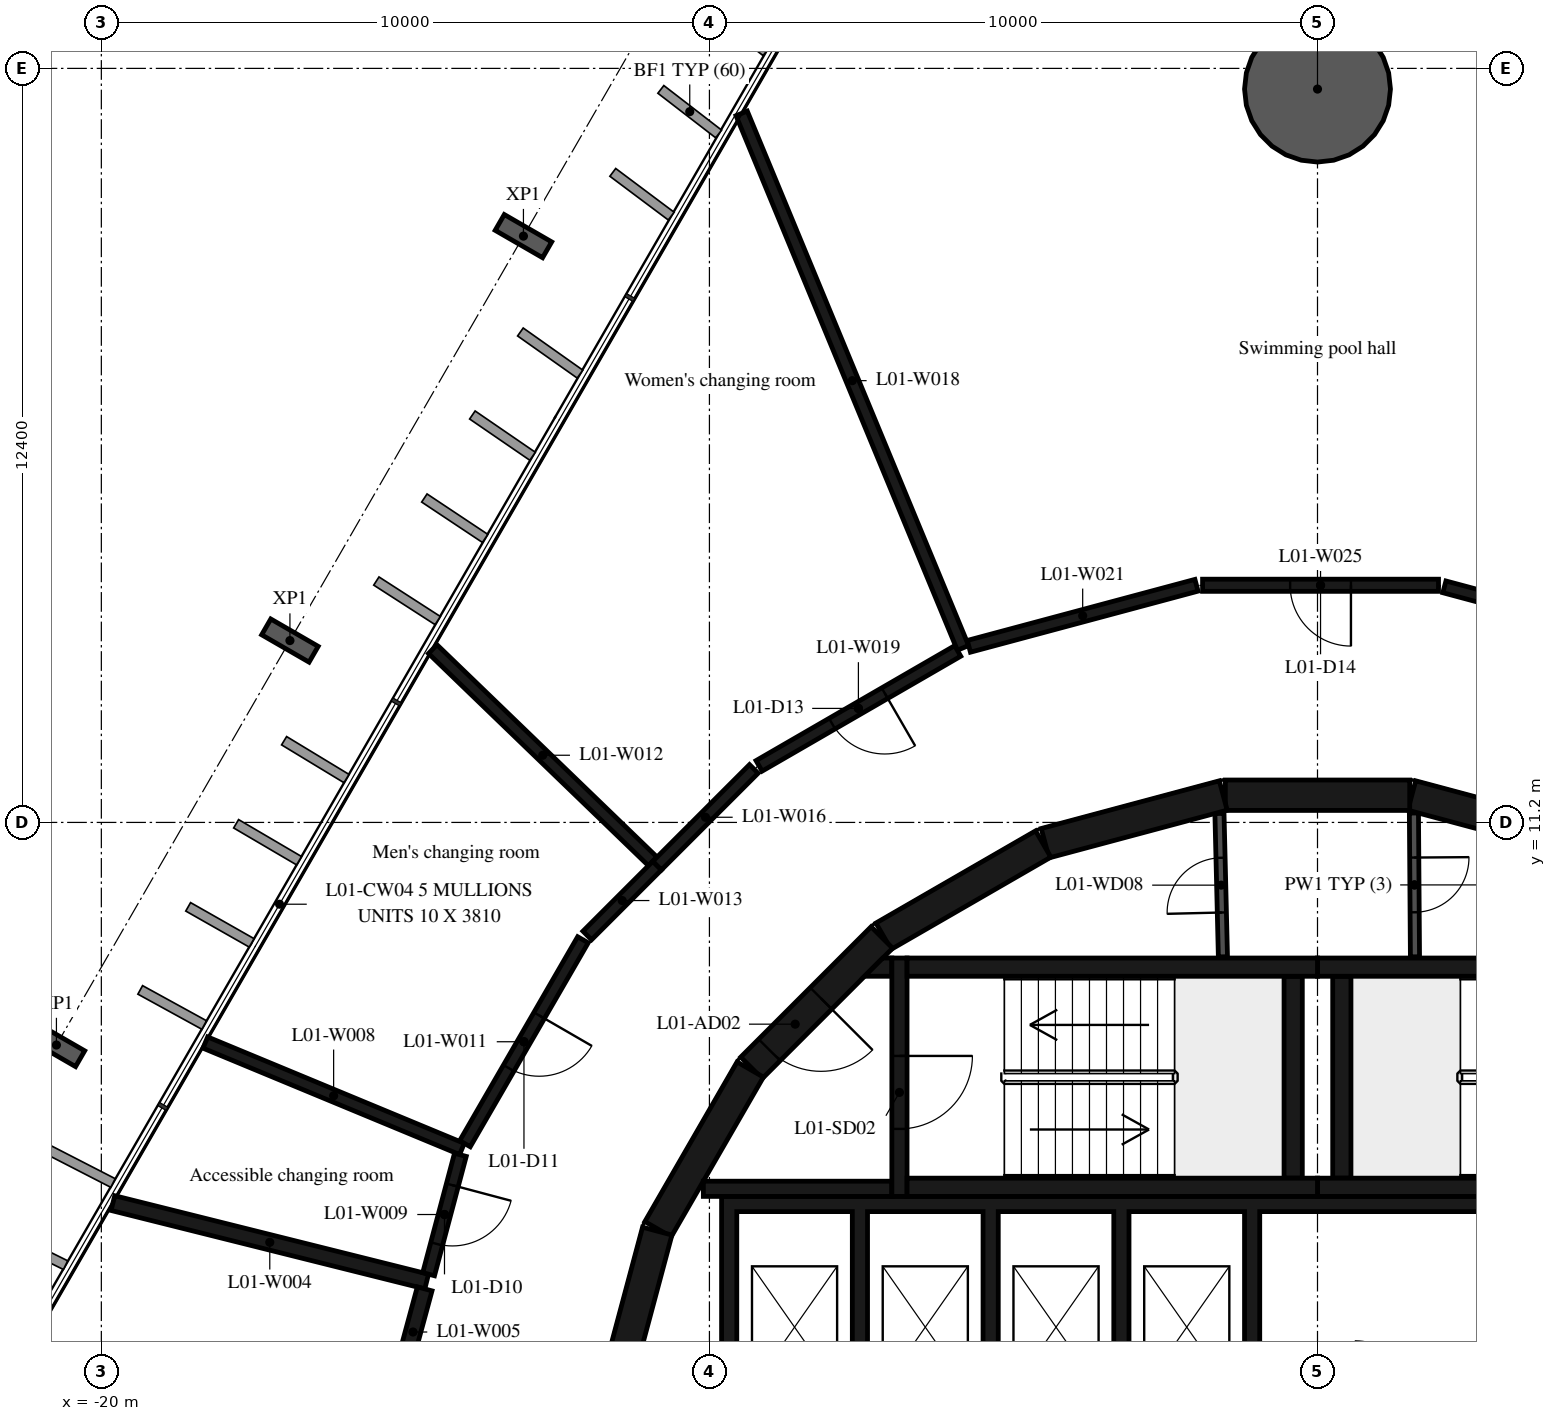
"""IFC4 building model, lengths in metres.
Left out: names, types, materials, properties, quantities, classifications, styles, units other than length and angle.
Written with IfcOpenShell. Run it as: python <this file> out.ifc"""

import sys

from ifc_helpers import new_model, si_unit, direction, frame, frame_2d, origin, origin_2d, place, context, subcontext, project, spatial, polyline, rectangle, hollow_circle, i_section, outline, extrude, element, fill, save


model = new_model("IFC4")
c1 = context("Model", 3, precision=1e-05, world=origin(), true_north=direction((0.0, 1.0)))
c2 = subcontext(c1, "Body", "Model", "MODEL_VIEW")
j1 = project(units=[si_unit("LENGTHUNIT", "METRE"), si_unit("PLANEANGLEUNIT", "RADIAN")], contexts=[c1])
p1 = place(None, origin())
s1 = spatial("IfcSite", under=j1, at=p1, CompositionType="ELEMENT")
p2 = place(p1, origin())
s2 = spatial("IfcBuilding", under=s1, at=p2, CompositionType="ELEMENT")
p3 = place(p2, frame((0.0, 0.0, 9.0)))
s3 = spatial("IfcBuildingStorey", under=s2, at=p3, CompositionType="ELEMENT", Elevation=9.0)
p4 = place(p3, frame((0.0, 23.26, -0.38), z_axis=(0.0, 0.0, 1.0), x_axis=(1.0, 0.0, 0.0)))
e1 = element("IfcColumn", 1, at=p4, inside=s3, PredefinedType="COLUMN", context=c2, shape_type="SweptSolid", body=[
    extrude(hollow_circle(Radius=1.2, WallThickness=0.06, at=origin_2d()), origin(), (0.0, 0.0, 1.0), 4.8),
])
for number, where, z_axis, x_axis in (
    (2, (-13.059, 20.842, -0.38), (0.0, 0.0, 1.0), (0.5, 0.866, 0.0)),
    (3, (-16.899, 14.19, -0.38), (0.0, 0.0, 1.0), (0.5, 0.866, 0.0)),
    (4, (-20.739, 7.539, -0.38), (0.0, 0.0, 1.0), (0.5, 0.866, 0.0)),
):
    element("IfcColumn", number, at=place(p3, frame(where, z_axis=z_axis, x_axis=x_axis)), inside=s3, PredefinedType="COLUMN", context=c2, shape_type="SweptSolid", body=[
        extrude(i_section(OverallWidth=0.3, OverallDepth=0.9, WebThickness=0.019, FlangeThickness=0.035, FilletRadius=0.03, at=origin_2d()), origin(), (0.0, 0.0, 1.0), 4.8),
    ])
for number, where, z_axis, x_axis in (
    (5, (4.479, 10.858, 0.0), (0.0, 0.0, 1.0), (-0.966, 0.259, 0.0)),
    (6, (1.516, 11.647, 0.0), (0.0, 0.0, 1.0), (-1.0, 0.0, 0.0)),
    (7, (-1.55, 11.643, 0.0), (0.0, 0.0, 1.0), (-0.966, -0.259, 0.0)),
    (8, (-4.51, 10.845, 0.0), (0.0, 0.0, 1.0), (-0.866, -0.5, 0.0)),
):
    element("IfcWall", number, at=place(p3, frame(where, z_axis=z_axis, x_axis=x_axis)), inside=s3, PredefinedType="SHEAR", context=c2, shape_type="SweptSolid", body=[
        extrude(rectangle(XDim=3.033, YDim=0.5, at=frame_2d((1.516, 0.0))), origin(), (0.0, 0.0, 1.0), 4.42),
    ])
p5 = place(p3, frame((-7.164, 9.308, 0.0), z_axis=(0.0, 0.0, 1.0), x_axis=(-0.707106781187, -0.707106781187, 0.0)))
e9 = element("IfcWall", 9, at=p5, inside=s3, PredefinedType="SHEAR", context=c2, shape_type="SweptSolid", body=[
    extrude(rectangle(XDim=3.032, YDim=0.5, at=frame_2d((1.516, 0.0))), origin(), (0.0, 0.0, 1.0), 4.42),
])
p6 = place(p5, frame((1.416, 0.0, 0.0)))
e10 = element("IfcOpeningElement", 10, at=p6, cuts=e9, PredefinedType="OPENING", context=c2, shape_type="SweptSolid", body=[
    extrude(rectangle(XDim=1.2, YDim=2.1, at=frame_2d((0.6, 1.05))), frame((0.0, 0.26, 0.0), z_axis=(0.0, -1.0, 0.0), x_axis=(1.0, 0.0, 0.0)), (0.0, 0.0, 1.0), 0.52),
])
for number, where, z_axis, x_axis in (
    (11, (-9.329, 7.137, 0.0), (0.0, 0.0, 1.0), (-0.5, -0.866, 0.0)),
    (12, (-10.858, 4.479, 0.0), (0.0, 0.0, 1.0), (-0.259, -0.966, 0.0)),
):
    element("IfcWall", number, at=place(p3, frame(where, z_axis=z_axis, x_axis=x_axis)), inside=s3, PredefinedType="SHEAR", context=c2, shape_type="SweptSolid", body=[
        extrude(rectangle(XDim=3.033, YDim=0.5, at=frame_2d((1.516, 0.0))), origin(), (0.0, 0.0, 1.0), 4.42),
    ])
for number, where, z_axis, x_axis in (
    (13, (0.0, 5.2, 0.0), (0.0, 0.0, 1.0), (1.0, 0.0, 0.0)),
    (14, (0.0, 8.82, 0.0), (0.0, 0.0, 1.0), (1.0, 0.0, 0.0)),
):
    element("IfcWall", number, at=place(p3, frame(where, z_axis=z_axis, x_axis=x_axis)), inside=s3, PredefinedType="SHEAR", context=c2, shape_type="SweptSolid", body=[
        extrude(rectangle(XDim=6.75, YDim=0.3, at=frame_2d((3.375, 0.0))), origin(), (0.0, 0.0, 1.0), 4.42),
    ])
p7 = place(p3, frame((0.4, 5.35, 0.0), z_axis=(0.0, 0.0, 1.0), x_axis=(0.0, 1.0, 0.0)))
e15 = element("IfcWall", 15, at=p7, inside=s3, PredefinedType="SHEAR", context=c2, shape_type="SweptSolid", body=[
    extrude(rectangle(XDim=3.32, YDim=0.3, at=frame_2d((1.66, 0.0))), origin(), (0.0, 0.0, 1.0), 4.42),
])
for number, where, z_axis, x_axis in (
    (16, (-6.75, 5.2, 0.0), (0.0, 0.0, 1.0), (1.0, 0.0, 0.0)),
    (17, (-6.75, 8.82, 0.0), (0.0, 0.0, 1.0), (1.0, 0.0, 0.0)),
):
    element("IfcWall", number, at=place(p3, frame(where, z_axis=z_axis, x_axis=x_axis)), inside=s3, PredefinedType="SHEAR", context=c2, shape_type="SweptSolid", body=[
        extrude(rectangle(XDim=6.75, YDim=0.3, at=frame_2d((3.375, 0.0))), origin(), (0.0, 0.0, 1.0), 4.42),
    ])
p8 = place(p3, frame((-0.4, 5.35, 0.0), z_axis=(0.0, 0.0, 1.0), x_axis=(0.0, 1.0, 0.0)))
e18 = element("IfcWall", 18, at=p8, inside=s3, PredefinedType="SHEAR", context=c2, shape_type="SweptSolid", body=[
    extrude(rectangle(XDim=3.32, YDim=0.3, at=frame_2d((1.66, 0.0))), origin(), (0.0, 0.0, 1.0), 4.42),
])
p9 = place(p3, frame((-6.875, 8.97, 0.0), z_axis=(0.0, 0.0, 1.0), x_axis=(0.0, -1.0, 0.0)))
e19 = element("IfcWall", 19, at=p9, inside=s3, PredefinedType="SHEAR", context=c2, shape_type="SweptSolid", body=[
    extrude(rectangle(XDim=3.92, YDim=0.25, at=frame_2d((1.96, 0.0))), origin(), (0.0, 0.0, 1.0), 4.42),
])
p10 = place(p9, frame((1.61, 0.0, 0.0)))
e20 = element("IfcOpeningElement", 20, at=p10, cuts=e19, PredefinedType="OPENING", context=c2, shape_type="SweptSolid", body=[
    extrude(rectangle(XDim=1.2, YDim=2.1, at=frame_2d((0.6, 1.05))), frame((0.0, 0.135, 0.0), z_axis=(0.0, -1.0, 0.0), x_axis=(1.0, 0.0, 0.0)), (0.0, 0.0, 1.0), 0.27),
])
p11 = place(p3, frame((-7.0, 5.175, 0.0), z_axis=(0.0, 0.0, 1.0), x_axis=(-1.0, 0.0, 0.0)))
e21 = element("IfcWall", 21, at=p11, inside=s3, PredefinedType="SHEAR", context=c2, shape_type="SweptSolid", body=[
    extrude(rectangle(XDim=3.1, YDim=0.25, at=frame_2d((1.55, 0.0))), origin(), (0.0, 0.0, 1.0), 4.42),
])
p12 = place(p3, origin())
e22 = element("IfcWall", 22, at=p12, inside=s3, PredefinedType="SHEAR", context=c2, shape_type="SweptSolid", body=[
    extrude(outline(polyline([(-7.148, 8.97), (-7.0, 8.97), (-7.0, 8.67), (-7.448, 8.67), (-7.148, 8.97)])), origin(), (0.0, 0.0, 1.0), 4.42),
])
p13 = place(p3, origin())
e23 = element("IfcWall", 23, at=p13, inside=s3, PredefinedType="SHEAR", context=c2, shape_type="SweptSolid", body=[
    extrude(outline(polyline([(-9.55, 4.8), (-7.65, 4.8), (-7.65, 1.9), (-7.4, 1.9), (-7.4, 4.8), (-5.5, 4.8), (-5.5, 1.9), (-5.25, 1.9), (-5.25, 4.8), (-3.35, 4.8), (-3.35, 1.9), (-3.1, 1.9), (-3.1, 4.8), (-1.2, 4.8), (-1.2, 1.9), (-0.95, 1.9), (-0.95, 4.8), (3.1, 4.8), (3.1, 1.9), (3.35, 1.9), (3.35, 4.8), (5.25, 4.8), (5.25, 1.9), (5.5, 1.9), (5.5, 4.8), (7.4, 4.8), (7.4, 1.9), (7.65, 1.9), (7.65, 4.8), (9.55, 4.8), (9.55, 1.9), (9.8, 1.9), (9.8, 4.8), (9.8, 5.05), (-9.8, 5.05), (-9.8, 4.8), (-9.8, 1.9), (-9.55, 1.9), (-9.55, 4.8)])), origin(), (0.0, 0.0, 1.0), 4.42),
])
p14 = place(p3, frame((1.586, 11.354, 0.0), z_axis=(0.0, 0.0, 1.0), x_axis=(0.007227482881, -0.999973881405, 0.0)))
e24 = element("IfcWall", 24, at=p14, inside=s3, PredefinedType="PARTITIONING", context=c2, shape_type="SweptSolid", body=[
    extrude(rectangle(XDim=2.365, YDim=0.15, at=frame_2d((1.182, 0.0))), origin(), (0.0, 0.0, 1.0), 4.42),
])
p15 = place(p14, frame((0.732, 0.0, 0.0)))
e25 = element("IfcOpeningElement", 25, at=p15, cuts=e24, PredefinedType="OPENING", context=c2, shape_type="SweptSolid", body=[
    extrude(rectangle(XDim=0.9, YDim=2.1, at=frame_2d((0.45, 1.05))), frame((0.0, 0.085, 0.0), z_axis=(0.0, -1.0, 0.0), x_axis=(1.0, 0.0, 0.0)), (0.0, 0.0, 1.0), 0.17),
])
p16 = place(p3, frame((-1.555, 8.99, 0.0), z_axis=(0.0, 0.0, 1.0), x_axis=(-0.024125549686, 0.999708936567, 0.0)))
e26 = element("IfcWall", 26, at=p16, inside=s3, PredefinedType="PARTITIONING", context=c2, shape_type="SweptSolid", body=[
    extrude(rectangle(XDim=2.358, YDim=0.15, at=frame_2d((1.179, 0.0))), origin(), (0.0, 0.0, 1.0), 4.42),
])
p17 = place(p16, frame((0.729, 0.0, 0.0)))
e27 = element("IfcOpeningElement", 27, at=p17, cuts=e26, PredefinedType="OPENING", context=c2, shape_type="SweptSolid", body=[
    extrude(rectangle(XDim=0.9, YDim=2.1, at=frame_2d((0.45, 1.05))), frame((0.0, 0.085, 0.0), z_axis=(0.0, -1.0, 0.0), x_axis=(1.0, 0.0, 0.0)), (0.0, 0.0, 1.0), 0.17),
])
p18 = place(p3, frame((-14.65, 3.65, 0.0), z_axis=(0.0, 0.0, 1.0), x_axis=(-0.970142500145, 0.242535625036, 0.0)))
e28 = element("IfcWall", 28, at=p18, inside=s3, PredefinedType="PARTITIONING", context=c2, shape_type="SweptSolid", body=[
    extrude(rectangle(XDim=5.319, YDim=0.25, at=frame_2d((2.659, 0.0))), origin(), (0.0, 0.0, 1.0), 4.42),
])
p19 = place(p3, frame((-14.683, 3.529, 0.0), z_axis=(0.0, 0.0, 1.0), x_axis=(-0.261753947787, -0.9651346387, 0.0)))
e29 = element("IfcWall", 29, at=p19, inside=s3, PredefinedType="PARTITIONING", context=c2, shape_type="SweptSolid", body=[
    extrude(rectangle(XDim=1.47, YDim=0.25, at=frame_2d((0.735, 0.0))), origin(), (0.0, 0.0, 1.0), 4.42),
])
p20 = place(p3, frame((-14.07, 5.83, 0.0), z_axis=(0.0, 0.0, 1.0), x_axis=(-0.923722282312, 0.383062847533, 0.0)))
e30 = element("IfcWall", 30, at=p20, inside=s3, PredefinedType="PARTITIONING", context=c2, shape_type="SweptSolid", body=[
    extrude(rectangle(XDim=4.568, YDim=0.2, at=frame_2d((2.284, 0.0))), origin(), (0.0, 0.0, 1.0), 4.42),
])
p21 = place(p3, frame((-14.096, 5.733, 0.0), z_axis=(0.0, 0.0, 1.0), x_axis=(-0.257131388612, -0.96637645304, 0.0)))
e31 = element("IfcWall", 31, at=p21, inside=s3, PredefinedType="PARTITIONING", context=c2, shape_type="SweptSolid", body=[
    extrude(rectangle(XDim=2.031, YDim=0.2, at=frame_2d((1.016, 0.0))), origin(), (0.0, 0.0, 1.0), 4.42),
])
p22 = place(p21, frame((0.515, 0.0, 0.0)))
e32 = element("IfcOpeningElement", 32, at=p22, cuts=e31, PredefinedType="OPENING", context=c2, shape_type="SweptSolid", body=[
    extrude(rectangle(XDim=1.0, YDim=2.1, at=frame_2d((0.5, 1.05))), frame((0.0, 0.11, 0.0), z_axis=(0.0, -1.0, 0.0), x_axis=(1.0, 0.0, 0.0)), (0.0, 0.0, 1.0), 0.22),
])
p23 = place(p3, frame((-12.08, 9.27, 0.0), z_axis=(0.0, 0.0, 1.0), x_axis=(-0.500733182901, -0.865601686425, 0.0)))
e33 = element("IfcWall", 33, at=p23, inside=s3, PredefinedType="PARTITIONING", context=c2, shape_type="SweptSolid", body=[
    extrude(rectangle(XDim=3.874, YDim=0.2, at=frame_2d((1.937, 0.0))), origin(), (0.0, 0.0, 1.0), 4.42),
])
p24 = place(p23, frame((1.437, 0.0, 0.0)))
e34 = element("IfcOpeningElement", 34, at=p24, cuts=e33, PredefinedType="OPENING", context=c2, shape_type="SweptSolid", body=[
    extrude(rectangle(XDim=1.0, YDim=2.1, at=frame_2d((0.5, 1.05))), frame((0.0, 0.11, 0.0), z_axis=(0.0, -1.0, 0.0), x_axis=(1.0, 0.0, 0.0)), (0.0, 0.0, 1.0), 0.22),
])
p25 = place(p3, frame((-10.932, 10.559, 0.0), z_axis=(0.0, 0.0, 1.0), x_axis=(-0.719667489814, 0.694318877825, 0.0)))
e35 = element("IfcWall", 35, at=p25, inside=s3, PredefinedType="PARTITIONING", context=c2, shape_type="SweptSolid", body=[
    extrude(rectangle(XDim=5.028, YDim=0.2, at=frame_2d((2.514, 0.0))), origin(), (0.0, 0.0, 1.0), 4.42),
])
p26 = place(p3, frame((-10.86, 10.49, 0.0), z_axis=(0.0, 0.0, 1.0), x_axis=(-0.707106781187, -0.707106781187, 0.0)))
e36 = element("IfcWall", 36, at=p26, inside=s3, PredefinedType="PARTITIONING", context=c2, shape_type="SweptSolid", body=[
    extrude(rectangle(XDim=1.625, YDim=0.2, at=frame_2d((0.812, 0.0))), origin(), (0.0, 0.0, 1.0), 4.42),
])
p27 = place(p3, frame((-9.27, 12.08, 0.0), z_axis=(0.0, 0.0, 1.0), x_axis=(-0.707106781187, -0.707106781187, 0.0)))
e37 = element("IfcWall", 37, at=p27, inside=s3, PredefinedType="PARTITIONING", context=c2, shape_type="SweptSolid", body=[
    extrude(rectangle(XDim=2.249, YDim=0.2, at=frame_2d((1.125, 0.0))), origin(), (0.0, 0.0, 1.0), 4.42),
])
p28 = place(p3, frame((-5.83, 14.07, 0.0), z_axis=(0.0, 0.0, 1.0), x_axis=(-0.382588257379, 0.923918949538, 0.0)))
e38 = element("IfcWall", 38, at=p28, inside=s3, PredefinedType="PARTITIONING", context=c2, shape_type="SweptSolid", body=[
    extrude(rectangle(XDim=9.514, YDim=0.2, at=frame_2d((4.757, 0.0))), origin(), (0.0, 0.0, 1.0), 4.42),
])
p29 = place(p3, frame((-5.917, 14.02, 0.0), z_axis=(0.0, 0.0, 1.0), x_axis=(-0.865591582237, -0.500750649286, 0.0)))
e39 = element("IfcWall", 39, at=p29, inside=s3, PredefinedType="PARTITIONING", context=c2, shape_type="SweptSolid", body=[
    extrude(rectangle(XDim=3.774, YDim=0.2, at=frame_2d((1.887, 0.0))), origin(), (0.0, 0.0, 1.0), 4.42),
])
p30 = place(p29, frame((1.387, 0.0, 0.0)))
e40 = element("IfcOpeningElement", 40, at=p30, cuts=e39, PredefinedType="OPENING", context=c2, shape_type="SweptSolid", body=[
    extrude(rectangle(XDim=1.0, YDim=2.1, at=frame_2d((0.5, 1.05))), frame((0.0, 0.11, 0.0), z_axis=(0.0, -1.0, 0.0), x_axis=(1.0, 0.0, 0.0)), (0.0, 0.0, 1.0), 0.22),
])
p31 = place(p3, frame((-1.99, 15.1, 0.0), z_axis=(0.0, 0.0, 1.0), x_axis=(-0.96585437197, -0.259085569159, 0.0)))
e41 = element("IfcWall", 41, at=p31, inside=s3, PredefinedType="PARTITIONING", context=c2, shape_type="SweptSolid", body=[
    extrude(rectangle(XDim=3.876, YDim=0.2, at=frame_2d((1.938, 0.0))), origin(), (0.0, 0.0, 1.0), 4.42),
])
p32 = place(p3, frame((1.99, 15.1, 0.0), z_axis=(0.0, 0.0, 1.0), x_axis=(-1.0, 0.0, 0.0)))
e42 = element("IfcWall", 42, at=p32, inside=s3, PredefinedType="PARTITIONING", context=c2, shape_type="SweptSolid", body=[
    extrude(rectangle(XDim=3.88, YDim=0.2, at=frame_2d((1.94, 0.0))), origin(), (0.0, 0.0, 1.0), 4.42),
])
p33 = place(p32, frame((1.44, 0.0, 0.0)))
e43 = element("IfcOpeningElement", 43, at=p33, cuts=e42, PredefinedType="OPENING", context=c2, shape_type="SweptSolid", body=[
    extrude(rectangle(XDim=1.0, YDim=2.1, at=frame_2d((0.5, 1.05))), frame((0.0, 0.11, 0.0), z_axis=(0.0, -1.0, 0.0), x_axis=(1.0, 0.0, 0.0)), (0.0, 0.0, 1.0), 0.22),
])
p34 = place(p3, frame((5.83, 14.07, 0.0), z_axis=(0.0, 0.0, 1.0), x_axis=(-0.965870133458, 0.259026804199, 0.0)))
e44 = element("IfcWall", 44, at=p34, inside=s3, PredefinedType="PARTITIONING", context=c2, shape_type="SweptSolid", body=[
    extrude(rectangle(XDim=3.876, YDim=0.2, at=frame_2d((1.938, 0.0))), origin(), (0.0, 0.0, 1.0), 4.42),
])
p35 = place(p10, origin())
e45 = element("IfcDoor", 45, at=p35, inside=s3, OperationType="SINGLE_SWING_LEFT", PredefinedType="DOOR", context=c2, shape_type="SweptSolid", body=[
    extrude(rectangle(XDim=1.2, YDim=2.1, at=frame_2d((0.6, 1.05))), frame((0.0, 0.025, 0.0), z_axis=(0.0, -1.0, 0.0), x_axis=(1.0, 0.0, 0.0)), (0.0, 0.0, 1.0), 0.05),
])
fill(e20, e45)
p36 = place(p6, origin())
e46 = element("IfcDoor", 46, at=p36, inside=s3, OperationType="SINGLE_SWING_RIGHT", PredefinedType="DOOR", context=c2, shape_type="SweptSolid", body=[
    extrude(rectangle(XDim=1.2, YDim=2.1, at=frame_2d((0.6, 1.05))), frame((0.0, 0.025, 0.0), z_axis=(0.0, -1.0, 0.0), x_axis=(1.0, 0.0, 0.0)), (0.0, 0.0, 1.0), 0.05),
])
fill(e10, e46)
p37 = place(p15, origin())
e47 = element("IfcDoor", 47, at=p37, inside=s3, OperationType="SINGLE_SWING_RIGHT", PredefinedType="DOOR", context=c2, shape_type="SweptSolid", body=[
    extrude(rectangle(XDim=0.9, YDim=2.1, at=frame_2d((0.45, 1.05))), frame((0.0, 0.025, 0.0), z_axis=(0.0, -1.0, 0.0), x_axis=(1.0, 0.0, 0.0)), (0.0, 0.0, 1.0), 0.05),
])
fill(e25, e47)
p38 = place(p17, origin())
e48 = element("IfcDoor", 48, at=p38, inside=s3, OperationType="SINGLE_SWING_LEFT", PredefinedType="DOOR", context=c2, shape_type="SweptSolid", body=[
    extrude(rectangle(XDim=0.9, YDim=2.1, at=frame_2d((0.45, 1.05))), frame((0.0, 0.025, 0.0), z_axis=(0.0, -1.0, 0.0), x_axis=(1.0, 0.0, 0.0)), (0.0, 0.0, 1.0), 0.05),
])
fill(e27, e48)
p39 = place(p22, origin())
e49 = element("IfcDoor", 49, at=p39, inside=s3, OperationType="SINGLE_SWING_LEFT", PredefinedType="DOOR", context=c2, shape_type="SweptSolid", body=[
    extrude(rectangle(XDim=1.0, YDim=2.1, at=frame_2d((0.5, 1.05))), frame((0.0, 0.025, 0.0), z_axis=(0.0, -1.0, 0.0), x_axis=(1.0, 0.0, 0.0)), (0.0, 0.0, 1.0), 0.05),
])
fill(e32, e49)
p40 = place(p24, origin())
e50 = element("IfcDoor", 50, at=p40, inside=s3, OperationType="SINGLE_SWING_LEFT", PredefinedType="DOOR", context=c2, shape_type="SweptSolid", body=[
    extrude(rectangle(XDim=1.0, YDim=2.1, at=frame_2d((0.5, 1.05))), frame((0.0, 0.025, 0.0), z_axis=(0.0, -1.0, 0.0), x_axis=(1.0, 0.0, 0.0)), (0.0, 0.0, 1.0), 0.05),
])
fill(e34, e50)
p41 = place(p30, origin())
e51 = element("IfcDoor", 51, at=p41, inside=s3, OperationType="SINGLE_SWING_LEFT", PredefinedType="DOOR", context=c2, shape_type="SweptSolid", body=[
    extrude(rectangle(XDim=1.0, YDim=2.1, at=frame_2d((0.5, 1.05))), frame((0.0, 0.025, 0.0), z_axis=(0.0, -1.0, 0.0), x_axis=(1.0, 0.0, 0.0)), (0.0, 0.0, 1.0), 0.05),
])
fill(e40, e51)
p42 = place(p33, origin())
e52 = element("IfcDoor", 52, at=p42, inside=s3, OperationType="SINGLE_SWING_LEFT", PredefinedType="DOOR", context=c2, shape_type="SweptSolid", body=[
    extrude(rectangle(XDim=1.0, YDim=2.1, at=frame_2d((0.5, 1.05))), frame((0.0, 0.025, 0.0), z_axis=(0.0, -1.0, 0.0), x_axis=(1.0, 0.0, 0.0)), (0.0, 0.0, 1.0), 0.05),
])
fill(e43, e52)
save(model, sys.argv[1])
